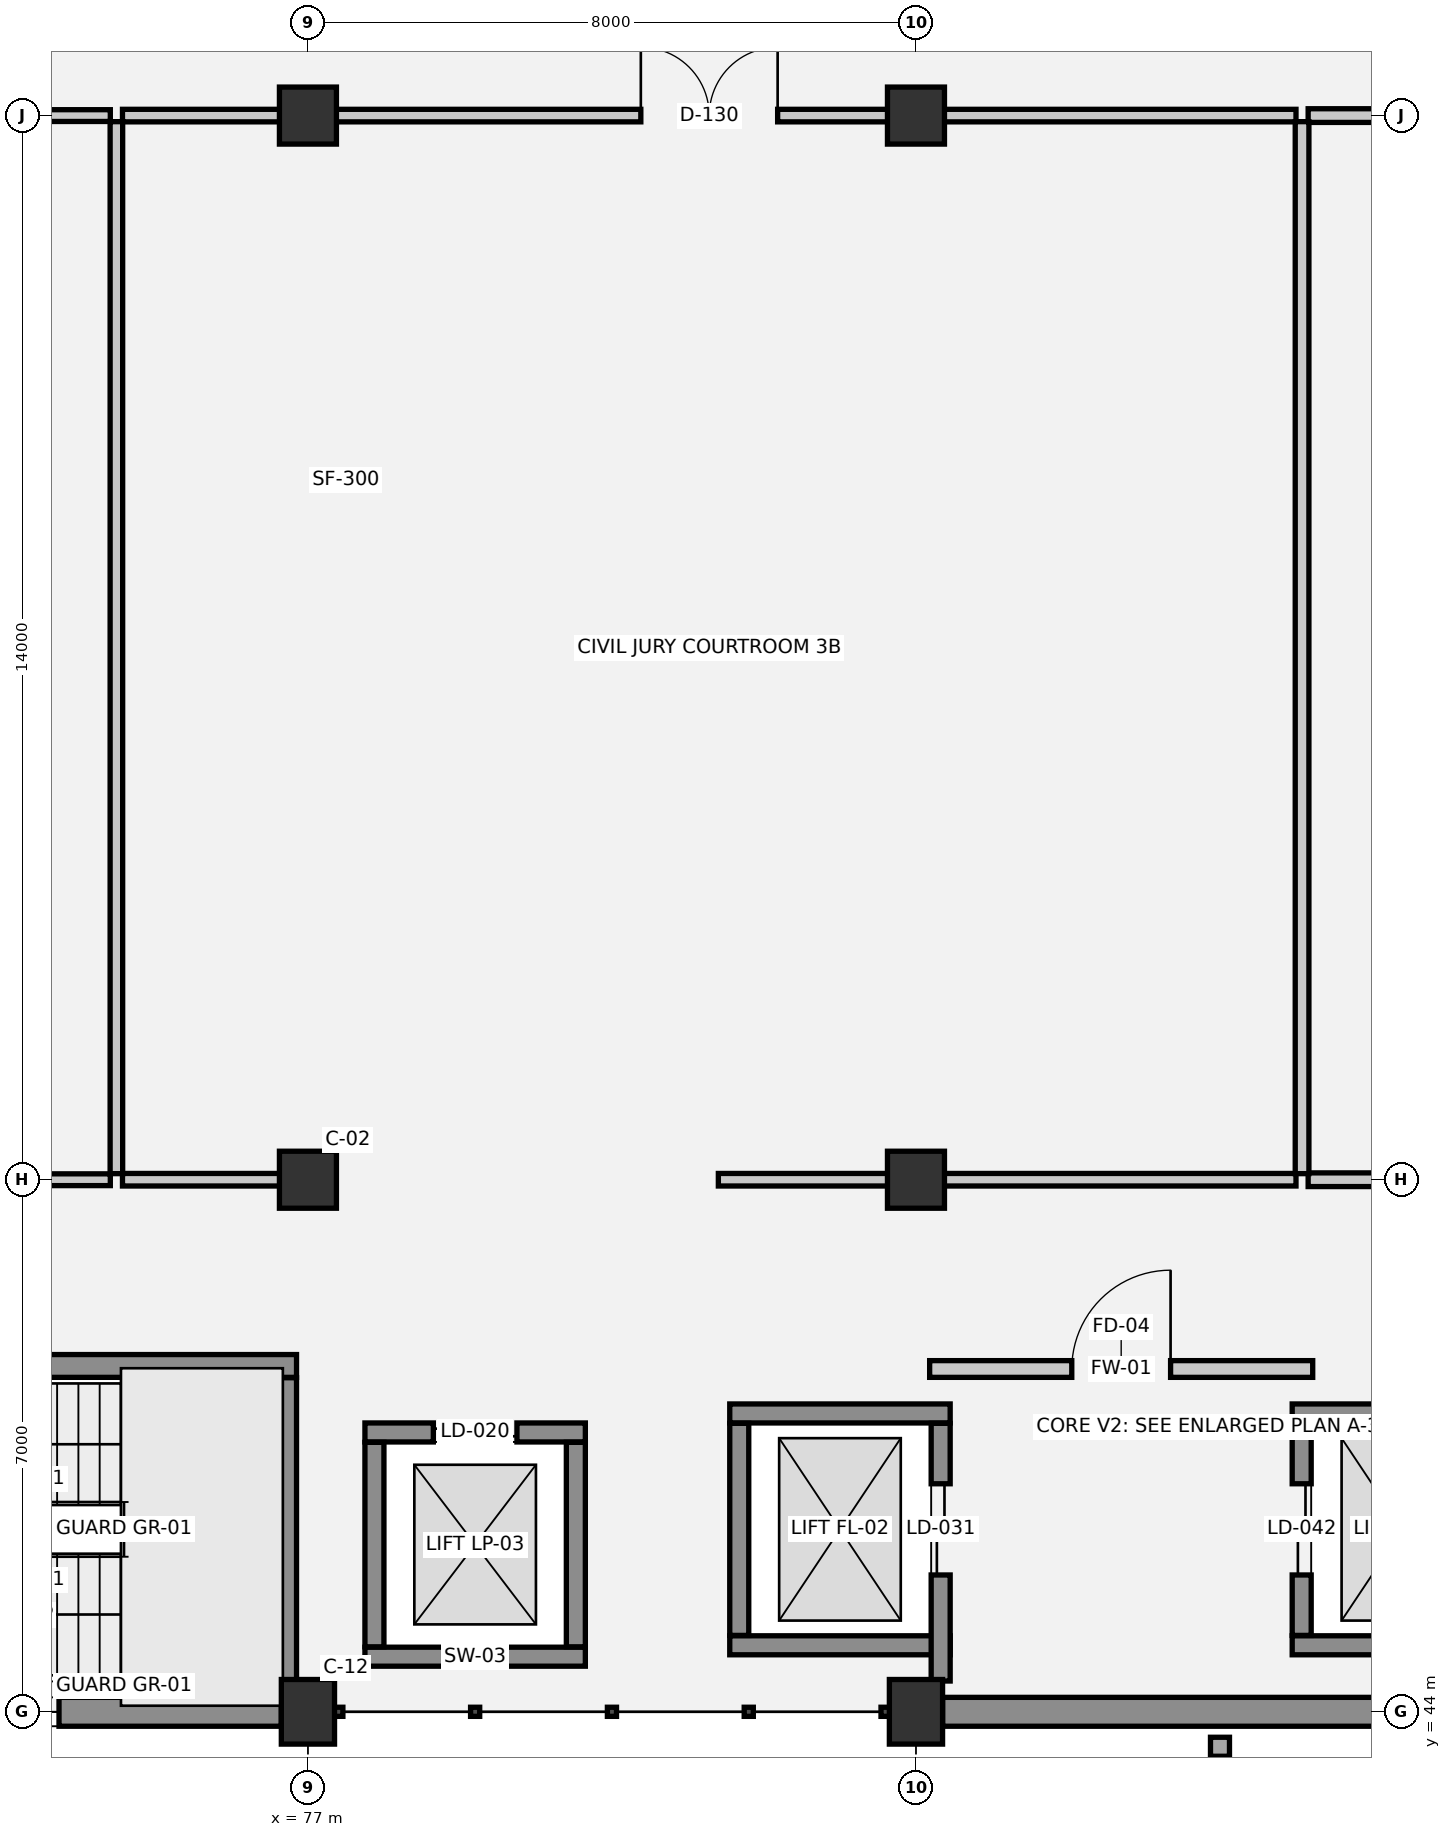
"""IFC4 building model, lengths in metres.
Left out: names, types, materials, properties, quantities, classifications, styles, units other than length and angle.
Written with IfcOpenShell. Run it as: python <this file> out.ifc"""

import sys

from ifc_helpers import new_model, si_unit, direction, frame, frame_2d, origin, origin_2d, place, context, subcontext, project, spatial, rectangle, extrude, element, fill, save


model = new_model("IFC4")
c1 = context("Model", 3, precision=1e-05, world=origin(), true_north=direction((0.0, 1.0)))
c2 = subcontext(c1, "Body", "Model", "MODEL_VIEW")
j1 = project(units=[si_unit("LENGTHUNIT", "METRE"), si_unit("PLANEANGLEUNIT", "RADIAN")], contexts=[c1])
p1 = place(None, origin())
s1 = spatial("IfcSite", under=j1, at=p1, CompositionType="ELEMENT")
p2 = place(p1, origin())
s2 = spatial("IfcBuilding", under=s1, at=p2, CompositionType="ELEMENT")
p3 = place(p2, frame((0.0, 0.0, 9.9)))
s3 = spatial("IfcBuildingStorey", under=s2, at=p3, CompositionType="ELEMENT", Elevation=9.9)
p4 = place(p3, frame((77.0, 44.0, 0.0), z_axis=(0.0, 0.0, 1.0), x_axis=(1.0, 0.0, 0.0)))
e1 = element("IfcColumn", 1, at=p4, inside=s3, PredefinedType="COLUMN", context=c2, shape_type="SweptSolid", body=[
    extrude(rectangle(XDim=0.7, YDim=0.85, at=origin_2d()), origin(), (0.0, 0.0, 1.0), 4.5),
])
for number, where, z_axis, x_axis in (
    (2, (77.0, 51.0, 0.0), (0.0, 0.0, 1.0), (1.0, 0.0, 0.0)),
    (3, (77.0, 65.0, 0.0), (0.0, 0.0, 1.0), (1.0, 0.0, 0.0)),
):
    element("IfcColumn", number, at=place(p3, frame(where, z_axis=z_axis, x_axis=x_axis)), inside=s3, PredefinedType="COLUMN", context=c2, shape_type="SweptSolid", body=[
        extrude(rectangle(XDim=0.75, YDim=0.75, at=origin_2d()), origin(), (0.0, 0.0, 1.0), 4.5),
    ])
p5 = place(p3, frame((85.0, 44.0, 0.0), z_axis=(0.0, 0.0, 1.0), x_axis=(1.0, 0.0, 0.0)))
e4 = element("IfcColumn", 4, at=p5, inside=s3, PredefinedType="COLUMN", context=c2, shape_type="SweptSolid", body=[
    extrude(rectangle(XDim=0.7, YDim=0.85, at=origin_2d()), origin(), (0.0, 0.0, 1.0), 4.5),
])
for number, where, z_axis, x_axis in (
    (5, (85.0, 51.0, 0.0), (0.0, 0.0, 1.0), (1.0, 0.0, 0.0)),
    (6, (85.0, 65.0, 0.0), (0.0, 0.0, 1.0), (1.0, 0.0, 0.0)),
):
    element("IfcColumn", number, at=place(p3, frame(where, z_axis=z_axis, x_axis=x_axis)), inside=s3, PredefinedType="COLUMN", context=c2, shape_type="SweptSolid", body=[
        extrude(rectangle(XDim=0.75, YDim=0.75, at=origin_2d()), origin(), (0.0, 0.0, 1.0), 4.5),
    ])
p6 = place(p3, frame((92.65, 44.0, 0.0), z_axis=(0.0, 0.0, 1.0), x_axis=(-1.0, 0.0, 0.0)))
e7 = element("IfcWall", 7, at=p6, inside=s3, PredefinedType="STANDARD", context=c2, shape_type="SweptSolid", body=[
    extrude(rectangle(XDim=7.3, YDim=0.38, at=frame_2d((3.65, 0.0))), origin(), (0.0, 0.0, 1.0), 3.23),
])
p7 = place(p3, frame((76.65, 44.0, 0.0), z_axis=(0.0, 0.0, 1.0), x_axis=(-1.0, 0.0, 0.0)))
e8 = element("IfcWall", 8, at=p7, inside=s3, PredefinedType="STANDARD", context=c2, shape_type="SweptSolid", body=[
    extrude(rectangle(XDim=7.3, YDim=0.38, at=frame_2d((3.65, 0.0))), origin(), (0.0, 0.0, 1.0), 3.23),
])
p8 = place(p7, frame((2.925, 0.0, 0.95)))
e9 = element("IfcOpeningElement", 9, at=p8, cuts=e8, PredefinedType="OPENING", context=c2, shape_type="SweptSolid", body=[
    extrude(rectangle(XDim=1.45, YDim=1.7, at=frame_2d((0.725, 0.85))), frame((0.0, 0.2, 0.0), z_axis=(0.0, -1.0, 0.0), x_axis=(1.0, 0.0, 0.0)), (0.0, 0.0, 1.0), 0.4),
])
p9 = place(p3, frame((77.75, 44.725, 0.0), z_axis=(0.0, 0.0, 1.0), x_axis=(1.0, 0.0, 0.0)))
e10 = element("IfcWall", 10, at=p9, inside=s3, PredefinedType="SHEAR", context=c2, shape_type="SweptSolid", body=[
    extrude(rectangle(XDim=2.9, YDim=0.25, at=frame_2d((1.45, 0.0))), origin(), (0.0, 0.0, 1.0), 4.5),
])
p10 = place(p3, frame((80.65, 47.675, 0.0), z_axis=(0.0, 0.0, 1.0), x_axis=(-1.0, 0.0, 0.0)))
e11 = element("IfcWall", 11, at=p10, inside=s3, PredefinedType="SHEAR", context=c2, shape_type="SweptSolid", body=[
    extrude(rectangle(XDim=2.9, YDim=0.25, at=frame_2d((1.45, 0.0))), origin(), (0.0, 0.0, 1.0), 4.5),
])
p11 = place(p10, frame((0.9, 0.0, 0.0)))
e12 = element("IfcOpeningElement", 12, at=p11, cuts=e11, PredefinedType="OPENING", context=c2, shape_type="SweptSolid", body=[
    extrude(rectangle(XDim=1.1, YDim=2.15, at=frame_2d((0.55, 1.075))), frame((0.0, 0.135, 0.0), z_axis=(0.0, -1.0, 0.0), x_axis=(1.0, 0.0, 0.0)), (0.0, 0.0, 1.0), 0.27),
])
for number, where, z_axis, x_axis in (
    (13, (77.875, 47.545, 0.0), (0.0, 0.0, 1.0), (0.0, -1.0, 0.0)),
    (14, (80.525, 44.855, 0.0), (0.0, 0.0, 1.0), (0.0, 1.0, 0.0)),
):
    element("IfcWall", number, at=place(p3, frame(where, z_axis=z_axis, x_axis=x_axis)), inside=s3, PredefinedType="SHEAR", context=c2, shape_type="SweptSolid", body=[
        extrude(rectangle(XDim=2.69, YDim=0.25, at=frame_2d((1.345, 0.0))), origin(), (0.0, 0.0, 1.0), 4.5),
    ])
for number, where, z_axis, x_axis in (
    (15, (82.55, 44.875, 0.0), (0.0, 0.0, 1.0), (1.0, 0.0, 0.0)),
    (16, (85.45, 47.925, 0.0), (0.0, 0.0, 1.0), (-1.0, 0.0, 0.0)),
):
    element("IfcWall", number, at=place(p3, frame(where, z_axis=z_axis, x_axis=x_axis)), inside=s3, PredefinedType="SHEAR", context=c2, shape_type="SweptSolid", body=[
        extrude(rectangle(XDim=2.9, YDim=0.25, at=frame_2d((1.45, 0.0))), origin(), (0.0, 0.0, 1.0), 4.5),
    ])
p12 = place(p3, frame((82.675, 47.795, 0.0), z_axis=(0.0, 0.0, 1.0), x_axis=(0.0, -1.0, 0.0)))
e17 = element("IfcWall", 17, at=p12, inside=s3, PredefinedType="SHEAR", context=c2, shape_type="SweptSolid", body=[
    extrude(rectangle(XDim=2.79, YDim=0.25, at=frame_2d((1.395, 0.0))), origin(), (0.0, 0.0, 1.0), 4.5),
])
p13 = place(p3, frame((85.325, 44.405, 0.0), z_axis=(0.0, 0.0, 1.0), x_axis=(0.0, 1.0, 0.0)))
e18 = element("IfcWall", 18, at=p13, inside=s3, PredefinedType="SHEAR", context=c2, shape_type="SweptSolid", body=[
    extrude(rectangle(XDim=3.39, YDim=0.25, at=frame_2d((1.695, 0.0))), origin(), (0.0, 0.0, 1.0), 4.5),
])
p14 = place(p13, frame((1.395, 0.0, 0.0)))
e19 = element("IfcOpeningElement", 19, at=p14, cuts=e18, PredefinedType="OPENING", context=c2, shape_type="SweptSolid", body=[
    extrude(rectangle(XDim=1.2, YDim=2.2, at=frame_2d((0.6, 1.1))), frame((0.0, 0.135, 0.0), z_axis=(0.0, -1.0, 0.0), x_axis=(1.0, 0.0, 0.0)), (0.0, 0.0, 1.0), 0.27),
])
for number, where, z_axis, x_axis in (
    (20, (89.95, 44.875, 0.0), (0.0, 0.0, 1.0), (1.0, 0.0, 0.0)),
    (21, (92.85, 47.925, 0.0), (0.0, 0.0, 1.0), (-1.0, 0.0, 0.0)),
):
    element("IfcWall", number, at=place(p3, frame(where, z_axis=z_axis, x_axis=x_axis)), inside=s3, PredefinedType="SHEAR", context=c2, shape_type="SweptSolid", body=[
        extrude(rectangle(XDim=2.9, YDim=0.25, at=frame_2d((1.45, 0.0))), origin(), (0.0, 0.0, 1.0), 4.5),
    ])
p15 = place(p3, frame((90.075, 47.795, 0.0), z_axis=(0.0, 0.0, 1.0), x_axis=(0.0, -1.0, 0.0)))
e22 = element("IfcWall", 22, at=p15, inside=s3, PredefinedType="SHEAR", context=c2, shape_type="SweptSolid", body=[
    extrude(rectangle(XDim=2.79, YDim=0.25, at=frame_2d((1.395, 0.0))), origin(), (0.0, 0.0, 1.0), 4.5),
])
p16 = place(p15, frame((0.795, 0.0, 0.0)))
e23 = element("IfcOpeningElement", 23, at=p16, cuts=e22, PredefinedType="OPENING", context=c2, shape_type="SweptSolid", body=[
    extrude(rectangle(XDim=1.2, YDim=2.2, at=frame_2d((0.6, 1.1))), frame((0.0, 0.135, 0.0), z_axis=(0.0, -1.0, 0.0), x_axis=(1.0, 0.0, 0.0)), (0.0, 0.0, 1.0), 0.27),
])
p17 = place(p3, frame((76.85, 48.55, 0.0), z_axis=(0.0, 0.0, 1.0), x_axis=(-1.0, 0.0, 0.0)))
e24 = element("IfcWall", 24, at=p17, inside=s3, PredefinedType="SHEAR", context=c2, shape_type="SweptSolid", body=[
    extrude(rectangle(XDim=7.7, YDim=0.3, at=frame_2d((3.85, 0.0))), origin(), (0.0, 0.0, 1.0), 4.2),
])
p18 = place(p17, frame((6.025, 0.0, 0.0)))
e25 = element("IfcOpeningElement", 25, at=p18, cuts=e24, PredefinedType="OPENING", context=c2, shape_type="SweptSolid", body=[
    extrude(rectangle(XDim=1.25, YDim=2.15, at=frame_2d((0.625, 1.075))), frame((0.0, 0.16, 0.0), z_axis=(0.0, -1.0, 0.0), x_axis=(1.0, 0.0, 0.0)), (0.0, 0.0, 1.0), 0.32),
])
p19 = place(p3, frame((76.7, 44.195, 0.0), z_axis=(0.0, 0.0, 1.0), x_axis=(0.0, 1.0, 0.0)))
e26 = element("IfcWall", 26, at=p19, inside=s3, PredefinedType="SHEAR", context=c2, shape_type="SweptSolid", body=[
    extrude(rectangle(XDim=4.2, YDim=0.3, at=frame_2d((2.1, 0.0))), origin(), (0.0, 0.0, 1.0), 4.2),
])
p20 = place(p3, frame((85.18, 48.51, 0.0), z_axis=(0.0, 0.0, 1.0), x_axis=(1.0, 0.0, 0.0)))
e27 = element("IfcWall", 27, at=p20, inside=s3, PredefinedType="SOLIDWALL", context=c2, shape_type="SweptSolid", body=[
    extrude(rectangle(XDim=5.04, YDim=0.22, at=frame_2d((2.52, 0.0))), origin(), (0.0, 0.0, 1.0), 4.2),
])
p21 = place(p20, frame((1.87, 0.0, 0.0)))
e28 = element("IfcOpeningElement", 28, at=p21, cuts=e27, PredefinedType="OPENING", context=c2, shape_type="SweptSolid", body=[
    extrude(rectangle(XDim=1.3, YDim=2.15, at=frame_2d((0.65, 1.075))), frame((0.0, 0.12, 0.0), z_axis=(0.0, -1.0, 0.0), x_axis=(1.0, 0.0, 0.0)), (0.0, 0.0, 1.0), 0.24),
])
p22 = place(p3, frame((62.08, 51.0, 0.0), z_axis=(0.0, 0.0, 1.0), x_axis=(1.0, 0.0, 0.0)))
e29 = element("IfcWall", 29, at=p22, inside=s3, PredefinedType="PARTITIONING", context=c2, shape_type="SweptSolid", body=[
    extrude(rectangle(XDim=12.32, YDim=0.155, at=frame_2d((6.16, 0.0))), origin(), (0.0, 0.0, 1.0), 3.4),
])
p23 = place(p22, frame((3.787, 0.0, 0.0)))
e30 = element("IfcOpeningElement", 30, at=p23, cuts=e29, PredefinedType="OPENING", context=c2, shape_type="SweptSolid", body=[
    extrude(rectangle(XDim=1.8, YDim=2.3, at=frame_2d((0.9, 1.15))), frame((0.0, 0.087, 0.0), z_axis=(0.0, -1.0, 0.0), x_axis=(1.0, 0.0, 0.0)), (0.0, 0.0, 1.0), 0.175),
])
p24 = place(p3, frame((74.56, 51.0, 0.0), z_axis=(0.0, 0.0, 1.0), x_axis=(1.0, 0.0, 0.0)))
e31 = element("IfcWall", 31, at=p24, inside=s3, PredefinedType="PARTITIONING", context=c2, shape_type="SweptSolid", body=[
    extrude(rectangle(XDim=2.64, YDim=0.165, at=frame_2d((1.32, 0.0))), origin(), (0.0, 0.0, 1.0), 3.4),
])
p25 = place(p3, frame((82.4, 51.0, 0.0), z_axis=(0.0, 0.0, 1.0), x_axis=(1.0, 0.0, 0.0)))
e32 = element("IfcWall", 32, at=p25, inside=s3, PredefinedType="PARTITIONING", context=c2, shape_type="SweptSolid", body=[
    extrude(rectangle(XDim=7.6, YDim=0.165, at=frame_2d((3.8, 0.0))), origin(), (0.0, 0.0, 1.0), 3.4),
])
p26 = place(p3, frame((90.16, 51.0, 0.0), z_axis=(0.0, 0.0, 1.0), x_axis=(1.0, 0.0, 0.0)))
e33 = element("IfcWall", 33, at=p26, inside=s3, PredefinedType="PARTITIONING", context=c2, shape_type="SweptSolid", body=[
    extrude(rectangle(XDim=8.16, YDim=0.18, at=frame_2d((4.08, 0.0))), origin(), (0.0, 0.0, 1.0), 3.4),
])
p27 = place(p3, frame((62.08, 65.0, 0.0), z_axis=(0.0, 0.0, 1.0), x_axis=(1.0, 0.0, 0.0)))
e34 = element("IfcWall", 34, at=p27, inside=s3, PredefinedType="PARTITIONING", context=c2, shape_type="SweptSolid", body=[
    extrude(rectangle(XDim=12.32, YDim=0.155, at=frame_2d((6.16, 0.0))), origin(), (0.0, 0.0, 1.0), 3.4),
])
p28 = place(p3, frame((74.56, 65.0, 0.0), z_axis=(0.0, 0.0, 1.0), x_axis=(1.0, 0.0, 0.0)))
e35 = element("IfcWall", 35, at=p28, inside=s3, PredefinedType="PARTITIONING", context=c2, shape_type="SweptSolid", body=[
    extrude(rectangle(XDim=15.44, YDim=0.165, at=frame_2d((7.72, 0.0))), origin(), (0.0, 0.0, 1.0), 3.4),
])
p29 = place(p28, frame((6.82, 0.0, 0.0)))
e36 = element("IfcOpeningElement", 36, at=p29, cuts=e35, PredefinedType="OPENING", context=c2, shape_type="SweptSolid", body=[
    extrude(rectangle(XDim=1.8, YDim=2.3, at=frame_2d((0.9, 1.15))), frame((0.0, 0.093, 0.0), z_axis=(0.0, -1.0, 0.0), x_axis=(1.0, 0.0, 0.0)), (0.0, 0.0, 1.0), 0.185),
])
p30 = place(p3, frame((90.16, 65.0, 0.0), z_axis=(0.0, 0.0, 1.0), x_axis=(1.0, 0.0, 0.0)))
e37 = element("IfcWall", 37, at=p30, inside=s3, PredefinedType="PARTITIONING", context=c2, shape_type="SweptSolid", body=[
    extrude(rectangle(XDim=8.16, YDim=0.18, at=frame_2d((4.08, 0.0))), origin(), (0.0, 0.0, 1.0), 3.4),
])
p31 = place(p3, frame((74.48, 51.08, 0.0), z_axis=(0.0, 0.0, 1.0), x_axis=(0.0, 1.0, 0.0)))
e38 = element("IfcWall", 38, at=p31, inside=s3, PredefinedType="PARTITIONING", context=c2, shape_type="SweptSolid", body=[
    extrude(rectangle(XDim=13.84, YDim=0.165, at=frame_2d((6.92, 0.0))), origin(), (0.0, 0.0, 1.0), 4.14),
])
p32 = place(p3, frame((90.08, 51.08, 0.0), z_axis=(0.0, 0.0, 1.0), x_axis=(0.0, 1.0, 0.0)))
e39 = element("IfcWall", 39, at=p32, inside=s3, PredefinedType="PARTITIONING", context=c2, shape_type="SweptSolid", body=[
    extrude(rectangle(XDim=13.84, YDim=0.18, at=frame_2d((6.92, 0.0))), origin(), (0.0, 0.0, 1.0), 4.14),
])
p33 = place(p11, origin())
e40 = element("IfcDoor", 40, at=p33, inside=s3, OperationType="DOUBLE_DOOR_SLIDING", PredefinedType="DOOR", context=c2, shape_type="SweptSolid", body=[
    extrude(rectangle(XDim=1.1, YDim=2.15, at=frame_2d((0.55, 1.075))), frame((0.0, 0.025, 0.0), z_axis=(0.0, -1.0, 0.0), x_axis=(1.0, 0.0, 0.0)), (0.0, 0.0, 1.0), 0.05),
])
fill(e12, e40)
p34 = place(p14, origin())
e41 = element("IfcDoor", 41, at=p34, inside=s3, OperationType="DOUBLE_DOOR_SLIDING", PredefinedType="DOOR", context=c2, shape_type="SweptSolid", body=[
    extrude(rectangle(XDim=1.2, YDim=2.2, at=frame_2d((0.6, 1.1))), frame((0.0, 0.025, 0.0), z_axis=(0.0, -1.0, 0.0), x_axis=(1.0, 0.0, 0.0)), (0.0, 0.0, 1.0), 0.05),
])
fill(e19, e41)
p35 = place(p16, origin())
e42 = element("IfcDoor", 42, at=p35, inside=s3, OperationType="DOUBLE_DOOR_SLIDING", PredefinedType="DOOR", context=c2, shape_type="SweptSolid", body=[
    extrude(rectangle(XDim=1.2, YDim=2.2, at=frame_2d((0.6, 1.1))), frame((0.0, 0.025, 0.0), z_axis=(0.0, -1.0, 0.0), x_axis=(1.0, 0.0, 0.0)), (0.0, 0.0, 1.0), 0.05),
])
fill(e23, e42)
p36 = place(p21, origin())
e43 = element("IfcDoor", 43, at=p36, inside=s3, OperationType="SINGLE_SWING_RIGHT", PredefinedType="DOOR", context=c2, shape_type="SweptSolid", body=[
    extrude(rectangle(XDim=1.3, YDim=2.15, at=frame_2d((0.65, 1.075))), frame((0.0, 0.025, 0.0), z_axis=(0.0, -1.0, 0.0), x_axis=(1.0, 0.0, 0.0)), (0.0, 0.0, 1.0), 0.05),
])
fill(e28, e43)
p37 = place(p29, origin())
e44 = element("IfcDoor", 44, at=p37, inside=s3, OperationType="DOUBLE_DOOR_SINGLE_SWING", PredefinedType="DOOR", context=c2, shape_type="SweptSolid", body=[
    extrude(rectangle(XDim=1.8, YDim=2.3, at=frame_2d((0.9, 1.15))), frame((0.0, 0.025, 0.0), z_axis=(0.0, -1.0, 0.0), x_axis=(1.0, 0.0, 0.0)), (0.0, 0.0, 1.0), 0.05),
])
fill(e36, e44)
p38 = place(p8, origin())
e45 = element("IfcWindow", 45, at=p38, inside=s3, PartitioningType="SINGLE_PANEL", PredefinedType="WINDOW", context=c2, shape_type="SweptSolid", body=[
    extrude(rectangle(XDim=1.45, YDim=1.7, at=frame_2d((0.725, 0.85))), frame((0.0, 0.03, 0.0), z_axis=(0.0, -1.0, 0.0), x_axis=(1.0, 0.0, 0.0)), (0.0, 0.0, 1.0), 0.06),
])
fill(e9, e45)
save(model, sys.argv[1])
